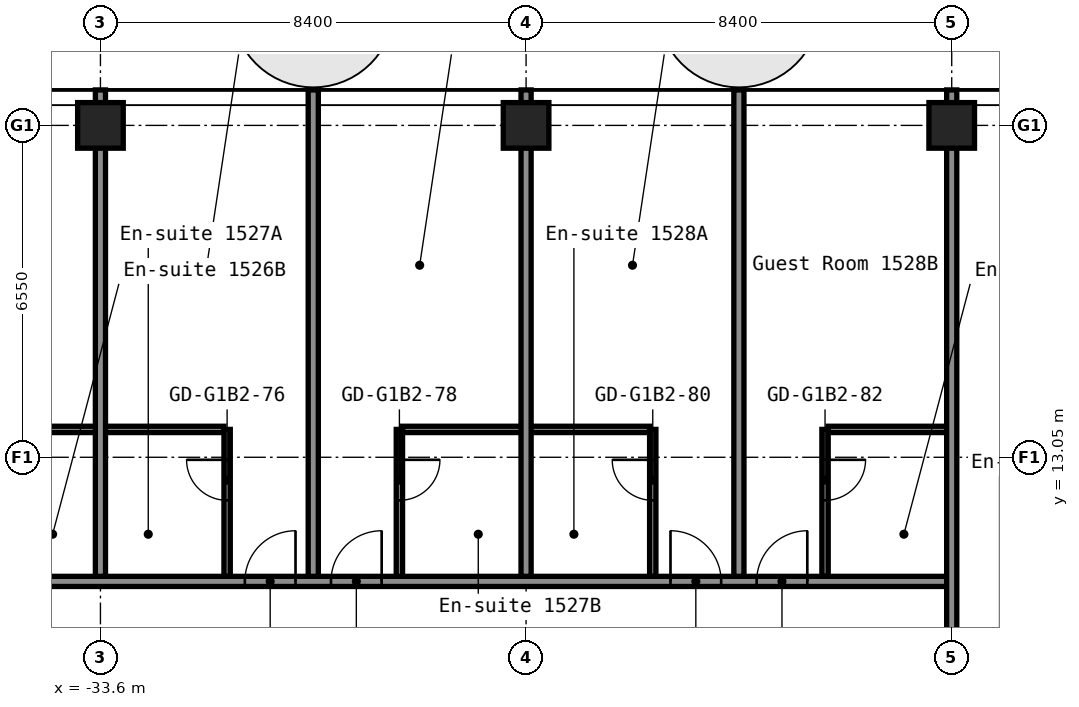
"""IFC4 building model, lengths in metres.
Left out: names, types, materials, properties, quantities, classifications, styles, units other than length and angle.
Written with IfcOpenShell. Run it as: python <this file> out.ifc"""

import sys

from ifc_helpers import new_model, si_unit, direction, frame, frame_2d, origin, origin_2d, place, context, subcontext, project, spatial, rectangle, hollow_rectangle, extrude, element, fill, save


model = new_model("IFC4")
c1 = context("Model", 3, precision=1e-05, world=origin(), true_north=direction((0.0, 1.0)))
c2 = subcontext(c1, "Body", "Model", "MODEL_VIEW")
j1 = project(units=[si_unit("LENGTHUNIT", "METRE"), si_unit("PLANEANGLEUNIT", "RADIAN")], contexts=[c1])
p1 = place(None, origin())
s1 = spatial("IfcSite", under=j1, at=p1, CompositionType="ELEMENT")
p2 = place(p1, origin())
s2 = spatial("IfcBuilding", under=s1, at=p2, CompositionType="ELEMENT")
p3 = place(p2, frame((0.0, 0.0, 55.0)))
s3 = spatial("IfcBuildingStorey", under=s2, at=p3, CompositionType="ELEMENT", Elevation=55.0)
for number, where, z_axis, x_axis in (
    (1, (-33.6, 19.6, 0.0), (0.0, 0.0, 1.0), (1.0, 0.0, 0.0)),
    (2, (-25.2, 19.6, 0.0), (0.0, 0.0, 1.0), (1.0, 0.0, 0.0)),
    (3, (-16.8, 19.6, 0.0), (0.0, 0.0, 1.0), (1.0, 0.0, 0.0)),
):
    element("IfcColumn", number, at=place(p3, frame(where, z_axis=z_axis, x_axis=x_axis)), inside=s3, PredefinedType="COLUMN", context=c2, shape_type="SweptSolid", body=[
        extrude(hollow_rectangle(XDim=0.9, YDim=0.9, WallThickness=0.036, at=origin_2d()), origin(), (0.0, 0.0, 1.0), 2.8),
    ])
p4 = place(p3, frame((-51.1, 10.6, 0.0), z_axis=(0.0, 0.0, 1.0), x_axis=(1.0, 0.0, 0.0)))
e4 = element("IfcWall", 4, at=p4, inside=s3, PredefinedType="PARTITIONING", context=c2, shape_type="SweptSolid", body=[
    extrude(rectangle(XDim=34.3, YDim=0.2, at=frame_2d((17.15, 0.0))), origin(), (0.0, 0.0, 1.0), 2.8),
])
p5 = place(p4, frame((3.25, 0.0, 0.0)))
e5 = element("IfcOpeningElement", 5, at=p5, cuts=e4, PredefinedType="OPENING", context=c2, shape_type="SweptSolid", body=[
    extrude(rectangle(XDim=1.0, YDim=2.1, at=frame_2d((0.5, 1.05))), frame((0.0, 0.11, 0.0), z_axis=(0.0, -1.0, 0.0), x_axis=(1.0, 0.0, 0.0)), (0.0, 0.0, 1.0), 0.22),
])
p6 = place(p4, frame((5.15, 0.0, 0.0)))
e6 = element("IfcOpeningElement", 6, at=p6, cuts=e4, PredefinedType="OPENING", context=c2, shape_type="SweptSolid", body=[
    extrude(rectangle(XDim=1.0, YDim=2.1, at=frame_2d((0.5, 1.05))), frame((0.0, 0.11, 0.0), z_axis=(0.0, -1.0, 0.0), x_axis=(1.0, 0.0, 0.0)), (0.0, 0.0, 1.0), 0.22),
])
p7 = place(p4, frame((11.95, 0.0, 0.0)))
e7 = element("IfcOpeningElement", 7, at=p7, cuts=e4, PredefinedType="OPENING", context=c2, shape_type="SweptSolid", body=[
    extrude(rectangle(XDim=1.0, YDim=2.1, at=frame_2d((0.5, 1.05))), frame((0.0, 0.11, 0.0), z_axis=(0.0, -1.0, 0.0), x_axis=(1.0, 0.0, 0.0)), (0.0, 0.0, 1.0), 0.22),
])
p8 = place(p4, frame((13.65, 0.0, 0.0)))
e8 = element("IfcOpeningElement", 8, at=p8, cuts=e4, PredefinedType="OPENING", context=c2, shape_type="SweptSolid", body=[
    extrude(rectangle(XDim=1.0, YDim=2.1, at=frame_2d((0.5, 1.05))), frame((0.0, 0.11, 0.0), z_axis=(0.0, -1.0, 0.0), x_axis=(1.0, 0.0, 0.0)), (0.0, 0.0, 1.0), 0.22),
])
p9 = place(p4, frame((20.35, 0.0, 0.0)))
e9 = element("IfcOpeningElement", 9, at=p9, cuts=e4, PredefinedType="OPENING", context=c2, shape_type="SweptSolid", body=[
    extrude(rectangle(XDim=1.0, YDim=2.1, at=frame_2d((0.5, 1.05))), frame((0.0, 0.11, 0.0), z_axis=(0.0, -1.0, 0.0), x_axis=(1.0, 0.0, 0.0)), (0.0, 0.0, 1.0), 0.22),
])
p10 = place(p4, frame((22.05, 0.0, 0.0)))
e10 = element("IfcOpeningElement", 10, at=p10, cuts=e4, PredefinedType="OPENING", context=c2, shape_type="SweptSolid", body=[
    extrude(rectangle(XDim=1.0, YDim=2.1, at=frame_2d((0.5, 1.05))), frame((0.0, 0.11, 0.0), z_axis=(0.0, -1.0, 0.0), x_axis=(1.0, 0.0, 0.0)), (0.0, 0.0, 1.0), 0.22),
])
p11 = place(p4, frame((28.75, 0.0, 0.0)))
e11 = element("IfcOpeningElement", 11, at=p11, cuts=e4, PredefinedType="OPENING", context=c2, shape_type="SweptSolid", body=[
    extrude(rectangle(XDim=1.0, YDim=2.1, at=frame_2d((0.5, 1.05))), frame((0.0, 0.11, 0.0), z_axis=(0.0, -1.0, 0.0), x_axis=(1.0, 0.0, 0.0)), (0.0, 0.0, 1.0), 0.22),
])
p12 = place(p4, frame((30.45, 0.0, 0.0)))
e12 = element("IfcOpeningElement", 12, at=p12, cuts=e4, PredefinedType="OPENING", context=c2, shape_type="SweptSolid", body=[
    extrude(rectangle(XDim=1.0, YDim=2.1, at=frame_2d((0.5, 1.05))), frame((0.0, 0.11, 0.0), z_axis=(0.0, -1.0, 0.0), x_axis=(1.0, 0.0, 0.0)), (0.0, 0.0, 1.0), 0.22),
])
for number, where, z_axis, x_axis in (
    (13, (-36.038, 13.6, 0.0), (0.0, 0.0, 1.0), (1.0, 0.0, 0.0)),
    (14, (-27.637, 13.6, 0.0), (0.0, 0.0, 1.0), (1.0, 0.0, 0.0)),
):
    element("IfcWall", number, at=place(p3, frame(where, z_axis=z_axis, x_axis=x_axis)), inside=s3, PredefinedType="PARTITIONING", context=c2, shape_type="SweptSolid", body=[
        extrude(rectangle(XDim=4.875, YDim=0.125, at=frame_2d((2.438, 0.0))), origin(), (0.0, 0.0, 1.0), 2.8),
    ])
p13 = place(p3, frame((-19.238, 13.6, 0.0), z_axis=(0.0, 0.0, 1.0), x_axis=(1.0, 0.0, 0.0)))
e15 = element("IfcWall", 15, at=p13, inside=s3, PredefinedType="PARTITIONING", context=c2, shape_type="SweptSolid", body=[
    extrude(rectangle(XDim=2.338, YDim=0.125, at=frame_2d((1.169, 0.0))), origin(), (0.0, 0.0, 1.0), 2.8),
])
p14 = place(p3, frame((-33.6, 10.7, 0.0), z_axis=(0.0, 0.0, 1.0), x_axis=(0.0, 1.0, 0.0)))
e16 = element("IfcWall", 16, at=p14, inside=s3, PredefinedType="PARTITIONING", context=c2, shape_type="SweptSolid", body=[
    extrude(rectangle(XDim=9.6, YDim=0.2, at=frame_2d((4.8, 0.0))), origin(), (0.0, 0.0, 1.0), 2.8),
])
p15 = place(p3, frame((-31.1, 10.7, 0.0), z_axis=(0.0, 0.0, 1.0), x_axis=(0.0, 1.0, 0.0)))
e17 = element("IfcWall", 17, at=p15, inside=s3, PredefinedType="PARTITIONING", context=c2, shape_type="SweptSolid", body=[
    extrude(rectangle(XDim=2.9, YDim=0.125, at=frame_2d((1.45, 0.0))), origin(), (0.0, 0.0, 1.0), 2.8),
])
p16 = place(p15, frame((1.5, 0.0, 0.0)))
e18 = element("IfcOpeningElement", 18, at=p16, cuts=e17, PredefinedType="OPENING", context=c2, shape_type="SweptSolid", body=[
    extrude(rectangle(XDim=0.8, YDim=2.1, at=frame_2d((0.4, 1.05))), frame((0.0, 0.073, 0.0), z_axis=(0.0, -1.0, 0.0), x_axis=(1.0, 0.0, 0.0)), (0.0, 0.0, 1.0), 0.145),
])
p17 = place(p3, frame((-29.4, 10.7, 0.0), z_axis=(0.0, 0.0, 1.0), x_axis=(0.0, 1.0, 0.0)))
e19 = element("IfcWall", 19, at=p17, inside=s3, PredefinedType="PARTITIONING", context=c2, shape_type="SweptSolid", body=[
    extrude(rectangle(XDim=9.6, YDim=0.2, at=frame_2d((4.8, 0.0))), origin(), (0.0, 0.0, 1.0), 2.8),
])
p18 = place(p3, frame((-27.7, 10.7, 0.0), z_axis=(0.0, 0.0, 1.0), x_axis=(0.0, 1.0, 0.0)))
e20 = element("IfcWall", 20, at=p18, inside=s3, PredefinedType="PARTITIONING", context=c2, shape_type="SweptSolid", body=[
    extrude(rectangle(XDim=2.9, YDim=0.125, at=frame_2d((1.45, 0.0))), origin(), (0.0, 0.0, 1.0), 2.8),
])
p19 = place(p18, frame((1.5, 0.0, 0.0)))
e21 = element("IfcOpeningElement", 21, at=p19, cuts=e20, PredefinedType="OPENING", context=c2, shape_type="SweptSolid", body=[
    extrude(rectangle(XDim=0.8, YDim=2.1, at=frame_2d((0.4, 1.05))), frame((0.0, 0.073, 0.0), z_axis=(0.0, -1.0, 0.0), x_axis=(1.0, 0.0, 0.0)), (0.0, 0.0, 1.0), 0.145),
])
p20 = place(p3, frame((-25.2, 10.7, 0.0), z_axis=(0.0, 0.0, 1.0), x_axis=(0.0, 1.0, 0.0)))
e22 = element("IfcWall", 22, at=p20, inside=s3, PredefinedType="PARTITIONING", context=c2, shape_type="SweptSolid", body=[
    extrude(rectangle(XDim=9.6, YDim=0.2, at=frame_2d((4.8, 0.0))), origin(), (0.0, 0.0, 1.0), 2.8),
])
p21 = place(p3, frame((-22.7, 10.7, 0.0), z_axis=(0.0, 0.0, 1.0), x_axis=(0.0, 1.0, 0.0)))
e23 = element("IfcWall", 23, at=p21, inside=s3, PredefinedType="PARTITIONING", context=c2, shape_type="SweptSolid", body=[
    extrude(rectangle(XDim=2.9, YDim=0.125, at=frame_2d((1.45, 0.0))), origin(), (0.0, 0.0, 1.0), 2.8),
])
p22 = place(p21, frame((1.5, 0.0, 0.0)))
e24 = element("IfcOpeningElement", 24, at=p22, cuts=e23, PredefinedType="OPENING", context=c2, shape_type="SweptSolid", body=[
    extrude(rectangle(XDim=0.8, YDim=2.1, at=frame_2d((0.4, 1.05))), frame((0.0, 0.073, 0.0), z_axis=(0.0, -1.0, 0.0), x_axis=(1.0, 0.0, 0.0)), (0.0, 0.0, 1.0), 0.145),
])
p23 = place(p3, frame((-21.0, 10.7, 0.0), z_axis=(0.0, 0.0, 1.0), x_axis=(0.0, 1.0, 0.0)))
e25 = element("IfcWall", 25, at=p23, inside=s3, PredefinedType="PARTITIONING", context=c2, shape_type="SweptSolid", body=[
    extrude(rectangle(XDim=9.6, YDim=0.2, at=frame_2d((4.8, 0.0))), origin(), (0.0, 0.0, 1.0), 2.8),
])
p24 = place(p3, frame((-19.3, 10.7, 0.0), z_axis=(0.0, 0.0, 1.0), x_axis=(0.0, 1.0, 0.0)))
e26 = element("IfcWall", 26, at=p24, inside=s3, PredefinedType="PARTITIONING", context=c2, shape_type="SweptSolid", body=[
    extrude(rectangle(XDim=2.9, YDim=0.125, at=frame_2d((1.45, 0.0))), origin(), (0.0, 0.0, 1.0), 2.8),
])
p25 = place(p24, frame((1.5, 0.0, 0.0)))
e27 = element("IfcOpeningElement", 27, at=p25, cuts=e26, PredefinedType="OPENING", context=c2, shape_type="SweptSolid", body=[
    extrude(rectangle(XDim=0.8, YDim=2.1, at=frame_2d((0.4, 1.05))), frame((0.0, 0.073, 0.0), z_axis=(0.0, -1.0, 0.0), x_axis=(1.0, 0.0, 0.0)), (0.0, 0.0, 1.0), 0.145),
])
p26 = place(p3, frame((-16.8, 8.39, 0.0), z_axis=(0.0, 0.0, 1.0), x_axis=(0.0, 1.0, 0.0)))
e28 = element("IfcWall", 28, at=p26, inside=s3, PredefinedType="PARTITIONING", context=c2, shape_type="SweptSolid", body=[
    extrude(rectangle(XDim=11.91, YDim=0.2, at=frame_2d((5.955, 0.0))), origin(), (0.0, 0.0, 1.0), 2.8),
])
p27 = place(p9, origin())
e29 = element("IfcDoor", 29, at=p27, inside=s3, OperationType="SINGLE_SWING_LEFT", PredefinedType="DOOR", context=c2, shape_type="SweptSolid", body=[
    extrude(rectangle(XDim=1.0, YDim=2.1, at=frame_2d((0.5, 1.05))), frame((0.0, 0.025, 0.0), z_axis=(0.0, -1.0, 0.0), x_axis=(1.0, 0.0, 0.0)), (0.0, 0.0, 1.0), 0.05),
])
fill(e9, e29)
p28 = place(p10, origin())
e30 = element("IfcDoor", 30, at=p28, inside=s3, OperationType="SINGLE_SWING_LEFT", PredefinedType="DOOR", context=c2, shape_type="SweptSolid", body=[
    extrude(rectangle(XDim=1.0, YDim=2.1, at=frame_2d((0.5, 1.05))), frame((0.0, 0.025, 0.0), z_axis=(0.0, -1.0, 0.0), x_axis=(1.0, 0.0, 0.0)), (0.0, 0.0, 1.0), 0.05),
])
fill(e10, e30)
p29 = place(p11, origin())
e31 = element("IfcDoor", 31, at=p29, inside=s3, OperationType="SINGLE_SWING_RIGHT", PredefinedType="DOOR", context=c2, shape_type="SweptSolid", body=[
    extrude(rectangle(XDim=1.0, YDim=2.1, at=frame_2d((0.5, 1.05))), frame((0.0, 0.025, 0.0), z_axis=(0.0, -1.0, 0.0), x_axis=(1.0, 0.0, 0.0)), (0.0, 0.0, 1.0), 0.05),
])
fill(e11, e31)
p30 = place(p12, origin())
e32 = element("IfcDoor", 32, at=p30, inside=s3, OperationType="SINGLE_SWING_LEFT", PredefinedType="DOOR", context=c2, shape_type="SweptSolid", body=[
    extrude(rectangle(XDim=1.0, YDim=2.1, at=frame_2d((0.5, 1.05))), frame((0.0, 0.025, 0.0), z_axis=(0.0, -1.0, 0.0), x_axis=(1.0, 0.0, 0.0)), (0.0, 0.0, 1.0), 0.05),
])
fill(e12, e32)
p31 = place(p16, origin())
e33 = element("IfcDoor", 33, at=p31, inside=s3, OperationType="SINGLE_SWING_LEFT", PredefinedType="DOOR", context=c2, shape_type="SweptSolid", body=[
    extrude(rectangle(XDim=0.8, YDim=2.1, at=frame_2d((0.4, 1.05))), frame((0.0, 0.025, 0.0), z_axis=(0.0, -1.0, 0.0), x_axis=(1.0, 0.0, 0.0)), (0.0, 0.0, 1.0), 0.05),
])
fill(e18, e33)
p32 = place(p19, origin())
e34 = element("IfcDoor", 34, at=p32, inside=s3, OperationType="SINGLE_SWING_RIGHT", PredefinedType="DOOR", context=c2, shape_type="SweptSolid", body=[
    extrude(rectangle(XDim=0.8, YDim=2.1, at=frame_2d((0.4, 1.05))), frame((0.0, 0.025, 0.0), z_axis=(0.0, -1.0, 0.0), x_axis=(1.0, 0.0, 0.0)), (0.0, 0.0, 1.0), 0.05),
])
fill(e21, e34)
p33 = place(p22, origin())
e35 = element("IfcDoor", 35, at=p33, inside=s3, OperationType="SINGLE_SWING_LEFT", PredefinedType="DOOR", context=c2, shape_type="SweptSolid", body=[
    extrude(rectangle(XDim=0.8, YDim=2.1, at=frame_2d((0.4, 1.05))), frame((0.0, 0.025, 0.0), z_axis=(0.0, -1.0, 0.0), x_axis=(1.0, 0.0, 0.0)), (0.0, 0.0, 1.0), 0.05),
])
fill(e24, e35)
p34 = place(p25, origin())
e36 = element("IfcDoor", 36, at=p34, inside=s3, OperationType="SINGLE_SWING_RIGHT", PredefinedType="DOOR", context=c2, shape_type="SweptSolid", body=[
    extrude(rectangle(XDim=0.8, YDim=2.1, at=frame_2d((0.4, 1.05))), frame((0.0, 0.025, 0.0), z_axis=(0.0, -1.0, 0.0), x_axis=(1.0, 0.0, 0.0)), (0.0, 0.0, 1.0), 0.05),
])
fill(e27, e36)
save(model, sys.argv[1])
